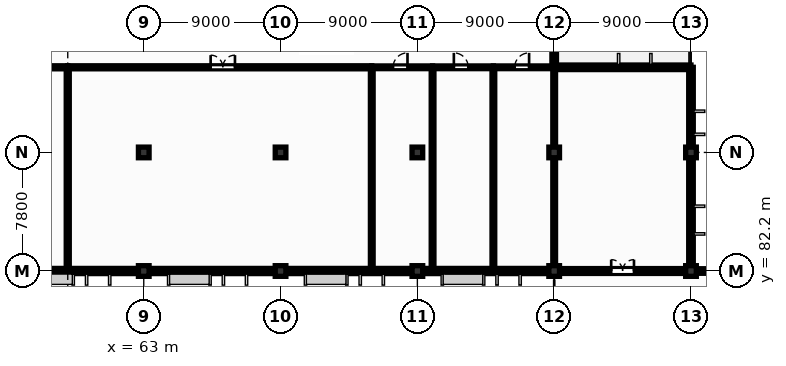
"""IFC4 building model, lengths in metres.
Left out: names, types, materials, properties, quantities, classifications, styles, units other than length and angle.
Written with IfcOpenShell. Run it as: python <this file> out.ifc"""

import sys

from ifc_helpers import new_model, si_unit, direction, frame, frame_2d, origin, origin_2d, place, context, subcontext, project, spatial, rectangle, extrude, element, fill, save


model = new_model("IFC4")
c1 = context("Model", 3, precision=1e-05, world=origin(), true_north=direction((0.0, 1.0)))
c2 = subcontext(c1, "Body", "Model", "MODEL_VIEW")
j1 = project(units=[si_unit("LENGTHUNIT", "METRE"), si_unit("PLANEANGLEUNIT", "RADIAN")], contexts=[c1])
p1 = place(None, origin())
s1 = spatial("IfcSite", under=j1, at=p1, CompositionType="ELEMENT")
p2 = place(p1, origin())
s2 = spatial("IfcBuilding", under=s1, at=p2, CompositionType="ELEMENT")
p3 = place(p2, frame((0.0, 0.0, 12.78)))
s3 = spatial("IfcBuildingStorey", under=s2, at=p3, CompositionType="ELEMENT", Elevation=12.78)
for number, where, z_axis, x_axis in (
    (1, (63.0, 82.2, 0.0), (0.0, 0.0, 1.0), (1.0, 0.0, 0.0)),
    (2, (63.0, 90.0, 0.0), (0.0, 0.0, 1.0), (1.0, 0.0, 0.0)),
    (3, (72.0, 82.2, 0.0), (0.0, 0.0, 1.0), (1.0, 0.0, 0.0)),
    (4, (72.0, 90.0, 0.0), (0.0, 0.0, 1.0), (1.0, 0.0, 0.0)),
    (5, (81.0, 82.2, 0.0), (0.0, 0.0, 1.0), (1.0, 0.0, 0.0)),
    (6, (81.0, 90.0, 0.0), (0.0, 0.0, 1.0), (1.0, 0.0, 0.0)),
    (7, (90.0, 82.2, 0.0), (0.0, 0.0, 1.0), (1.0, 0.0, 0.0)),
    (8, (90.0, 90.0, 0.0), (0.0, 0.0, 1.0), (1.0, 0.0, 0.0)),
    (9, (99.0, 82.2, 0.0), (0.0, 0.0, 1.0), (1.0, 0.0, 0.0)),
    (10, (99.0, 90.0, 0.0), (0.0, 0.0, 1.0), (1.0, 0.0, 0.0)),
):
    element("IfcColumn", number, at=place(p3, frame(where, z_axis=z_axis, x_axis=x_axis)), inside=s3, PredefinedType="COLUMN", context=c2, shape_type="SweptSolid", body=[
        extrude(rectangle(XDim=0.7, YDim=0.7, at=origin_2d()), origin(), (0.0, 0.0, 1.0), 3.74),
    ])
p4 = place(p3, frame((54.0, 82.2, 0.0), z_axis=(0.0, 0.0, 1.0), x_axis=(1.0, 0.0, 0.0)))
e11 = element("IfcWall", 11, at=p4, inside=s3, PredefinedType="SOLIDWALL", context=c2, shape_type="SweptSolid", body=[
    extrude(rectangle(XDim=9.0, YDim=0.34, at=frame_2d((4.5, 0.0))), origin(), (0.0, 0.0, 1.0), 3.42),
])
p5 = place(p4, frame((5.4, 0.0, 0.575)))
e12 = element("IfcOpeningElement", 12, at=p5, cuts=e11, PredefinedType="OPENING", context=c2, shape_type="SweptSolid", body=[
    extrude(rectangle(XDim=1.2, YDim=2.1, at=frame_2d((0.6, 1.05))), frame((0.0, 0.18, 0.0), z_axis=(0.0, -1.0, 0.0), x_axis=(1.0, 0.0, 0.0)), (0.0, 0.0, 1.0), 0.36),
])
p6 = place(p3, frame((63.0, 82.2, 0.0), z_axis=(0.0, 0.0, 1.0), x_axis=(1.0, 0.0, 0.0)))
e13 = element("IfcWall", 13, at=p6, inside=s3, PredefinedType="SOLIDWALL", context=c2, shape_type="SweptSolid", body=[
    extrude(rectangle(XDim=9.0, YDim=0.34, at=frame_2d((4.5, 0.0))), origin(), (0.0, 0.0, 1.0), 3.42),
])
p7 = place(p6, frame((1.8, 0.0, 0.85)))
e14 = element("IfcOpeningElement", 14, at=p7, cuts=e13, PredefinedType="OPENING", context=c2, shape_type="SweptSolid", body=[
    extrude(rectangle(XDim=2.4, YDim=1.1, at=frame_2d((1.2, 0.55))), frame((0.0, 0.18, 0.0), z_axis=(0.0, -1.0, 0.0), x_axis=(1.0, 0.0, 0.0)), (0.0, 0.0, 1.0), 0.36),
])
p8 = place(p6, frame((5.4, 0.0, 0.575)))
e15 = element("IfcOpeningElement", 15, at=p8, cuts=e13, PredefinedType="OPENING", context=c2, shape_type="SweptSolid", body=[
    extrude(rectangle(XDim=1.2, YDim=2.1, at=frame_2d((0.6, 1.05))), frame((0.0, 0.18, 0.0), z_axis=(0.0, -1.0, 0.0), x_axis=(1.0, 0.0, 0.0)), (0.0, 0.0, 1.0), 0.36),
])
p9 = place(p3, frame((72.0, 82.2, 0.0), z_axis=(0.0, 0.0, 1.0), x_axis=(1.0, 0.0, 0.0)))
e16 = element("IfcWall", 16, at=p9, inside=s3, PredefinedType="SOLIDWALL", context=c2, shape_type="SweptSolid", body=[
    extrude(rectangle(XDim=9.0, YDim=0.34, at=frame_2d((4.5, 0.0))), origin(), (0.0, 0.0, 1.0), 3.42),
])
p10 = place(p9, frame((1.8, 0.0, 0.85)))
e17 = element("IfcOpeningElement", 17, at=p10, cuts=e16, PredefinedType="OPENING", context=c2, shape_type="SweptSolid", body=[
    extrude(rectangle(XDim=2.4, YDim=1.1, at=frame_2d((1.2, 0.55))), frame((0.0, 0.18, 0.0), z_axis=(0.0, -1.0, 0.0), x_axis=(1.0, 0.0, 0.0)), (0.0, 0.0, 1.0), 0.36),
])
p11 = place(p3, frame((81.0, 82.2, 0.0), z_axis=(0.0, 0.0, 1.0), x_axis=(1.0, 0.0, 0.0)))
e18 = element("IfcWall", 18, at=p11, inside=s3, PredefinedType="SOLIDWALL", context=c2, shape_type="SweptSolid", body=[
    extrude(rectangle(XDim=9.0, YDim=0.34, at=frame_2d((4.5, 0.0))), origin(), (0.0, 0.0, 1.0), 3.42),
])
p12 = place(p11, frame((1.8, 0.0, 0.85)))
e19 = element("IfcOpeningElement", 19, at=p12, cuts=e18, PredefinedType="OPENING", context=c2, shape_type="SweptSolid", body=[
    extrude(rectangle(XDim=2.4, YDim=1.1, at=frame_2d((1.2, 0.55))), frame((0.0, 0.18, 0.0), z_axis=(0.0, -1.0, 0.0), x_axis=(1.0, 0.0, 0.0)), (0.0, 0.0, 1.0), 0.36),
])
p13 = place(p11, frame((5.4, 0.0, 0.665)))
e20 = element("IfcOpeningElement", 20, at=p13, cuts=e18, PredefinedType="OPENING", context=c2, shape_type="SweptSolid", body=[
    extrude(rectangle(XDim=1.2, YDim=2.1, at=frame_2d((0.6, 1.05))), frame((0.0, 0.18, 0.0), z_axis=(0.0, -1.0, 0.0), x_axis=(1.0, 0.0, 0.0)), (0.0, 0.0, 1.0), 0.36),
])
p14 = place(p3, frame((99.0, 82.2, 0.0), z_axis=(0.0, 0.0, 1.0), x_axis=(0.0, 1.0, 0.0)))
e21 = element("IfcWall", 21, at=p14, inside=s3, PredefinedType="SOLIDWALL", context=c2, shape_type="SweptSolid", body=[
    extrude(rectangle(XDim=13.4, YDim=0.3, at=frame_2d((6.7, 0.0))), origin(), (0.0, 0.0, 1.0), 2.685),
])
p15 = place(p14, frame((2.6, 0.0, 0.465)))
e22 = element("IfcOpeningElement", 22, at=p15, cuts=e21, PredefinedType="OPENING", context=c2, shape_type="SweptSolid", body=[
    extrude(rectangle(XDim=1.5, YDim=2.1, at=frame_2d((0.75, 1.05))), frame((0.0, 0.16, 0.0), z_axis=(0.0, -1.0, 0.0), x_axis=(1.0, 0.0, 0.0)), (0.0, 0.0, 1.0), 0.32),
])
p16 = place(p14, frame((9.15, 0.0, 0.465)))
e23 = element("IfcOpeningElement", 23, at=p16, cuts=e21, PredefinedType="OPENING", context=c2, shape_type="SweptSolid", body=[
    extrude(rectangle(XDim=1.2, YDim=2.1, at=frame_2d((0.6, 1.05))), frame((0.0, 0.16, 0.0), z_axis=(0.0, -1.0, 0.0), x_axis=(1.0, 0.0, 0.0)), (0.0, 0.0, 1.0), 0.32),
])
p17 = place(p3, frame((99.0, 95.6, 0.0), z_axis=(0.0, 0.0, 1.0), x_axis=(-1.0, 0.0, 0.0)))
e24 = element("IfcWall", 24, at=p17, inside=s3, PredefinedType="SOLIDWALL", context=c2, shape_type="SweptSolid", body=[
    extrude(rectangle(XDim=9.0, YDim=0.3, at=frame_2d((4.5, 0.0))), origin(), (0.0, 0.0, 1.0), 3.42),
])
p18 = place(p17, frame((2.8, 0.0, 0.95)))
e25 = element("IfcOpeningElement", 25, at=p18, cuts=e24, PredefinedType="OPENING", context=c2, shape_type="SweptSolid", body=[
    extrude(rectangle(XDim=1.8, YDim=2.1, at=frame_2d((0.9, 1.05))), frame((0.0, 0.16, 0.0), z_axis=(0.0, -1.0, 0.0), x_axis=(1.0, 0.0, 0.0)), (0.0, 0.0, 1.0), 0.32),
])
p19 = place(p3, frame((90.0, 95.6, 0.0), z_axis=(0.0, 0.0, 1.0), x_axis=(0.0, 1.0, 0.0)))
e26 = element("IfcWall", 26, at=p19, inside=s3, PredefinedType="SOLIDWALL", context=c2, shape_type="SweptSolid", body=[
    extrude(rectangle(XDim=18.4, YDim=0.3, at=frame_2d((9.2, 0.0))), origin(), (0.0, 0.0, 1.0), 2.805),
])
p20 = place(p19, frame((4.4, 0.0, 0.0)))
e27 = element("IfcOpeningElement", 27, at=p20, cuts=e26, PredefinedType="OPENING", context=c2, shape_type="SweptSolid", body=[
    extrude(rectangle(XDim=1.6, YDim=2.25, at=frame_2d((0.8, 1.125))), frame((0.0, 0.16, 0.0), z_axis=(0.0, -1.0, 0.0), x_axis=(1.0, 0.0, 0.0)), (0.0, 0.0, 1.0), 0.32),
])
p21 = place(p19, frame((12.8, 0.0, 0.935)))
e28 = element("IfcOpeningElement", 28, at=p21, cuts=e26, PredefinedType="OPENING", context=c2, shape_type="SweptSolid", body=[
    extrude(rectangle(XDim=1.05, YDim=1.75, at=frame_2d((0.525, 0.875))), frame((0.0, 0.16, 0.0), z_axis=(0.0, -1.0, 0.0), x_axis=(1.0, 0.0, 0.0)), (0.0, 0.0, 1.0), 0.32),
])
p22 = place(p3, frame((99.0, 82.2, 0.0), z_axis=(0.0, 0.0, 1.0), x_axis=(1.0, 0.0, 0.0)))
e29 = element("IfcWall", 29, at=p22, inside=s3, PredefinedType="SOLIDWALL", context=c2, shape_type="SweptSolid", body=[
    extrude(rectangle(XDim=9.0, YDim=0.3, at=frame_2d((4.5, 0.0))), origin(), (0.0, 0.0, 1.0), 2.853),
])
p23 = place(p22, frame((2.6, 0.0, 0.633)))
e30 = element("IfcOpeningElement", 30, at=p23, cuts=e29, PredefinedType="OPENING", context=c2, shape_type="SweptSolid", body=[
    extrude(rectangle(XDim=1.8, YDim=2.1, at=frame_2d((0.9, 1.05))), frame((0.0, 0.16, 0.0), z_axis=(0.0, -1.0, 0.0), x_axis=(1.0, 0.0, 0.0)), (0.0, 0.0, 1.0), 0.32),
])
p24 = place(p3, frame((90.0, 82.2, 0.0), z_axis=(0.0, 0.0, 1.0), x_axis=(1.0, 0.0, 0.0)))
e31 = element("IfcWall", 31, at=p24, inside=s3, PredefinedType="SHEAR", context=c2, shape_type="SweptSolid", body=[
    extrude(rectangle(XDim=9.0, YDim=0.32, at=frame_2d((4.5, 0.0))), origin(), (0.0, 0.0, 1.0), 3.42),
])
p25 = place(p24, frame((3.75, 0.0, 0.0)))
e32 = element("IfcOpeningElement", 32, at=p25, cuts=e31, PredefinedType="OPENING", context=c2, shape_type="SweptSolid", body=[
    extrude(rectangle(XDim=1.5, YDim=2.2, at=frame_2d((0.75, 1.1))), frame((0.0, 0.17, 0.0), z_axis=(0.0, -1.0, 0.0), x_axis=(1.0, 0.0, 0.0)), (0.0, 0.0, 1.0), 0.34),
])
p26 = place(p3, frame((36.0, 95.6, 0.0), z_axis=(0.0, 0.0, 1.0), x_axis=(1.0, 0.0, 0.0)))
e33 = element("IfcWall", 33, at=p26, inside=s3, PredefinedType="PARTITIONING", context=c2, shape_type="SweptSolid", body=[
    extrude(rectangle(XDim=22.0, YDim=0.2, at=frame_2d((11.0, 0.0))), origin(), (0.0, 0.0, 1.0), 3.42),
])
p27 = place(p26, frame((10.4, 0.0, 0.0)))
e34 = element("IfcOpeningElement", 34, at=p27, cuts=e33, PredefinedType="OPENING", context=c2, shape_type="SweptSolid", body=[
    extrude(rectangle(XDim=1.6, YDim=2.2, at=frame_2d((0.8, 1.1))), frame((0.0, 0.11, 0.0), z_axis=(0.0, -1.0, 0.0), x_axis=(1.0, 0.0, 0.0)), (0.0, 0.0, 1.0), 0.22),
])
p28 = place(p3, frame((58.0, 95.6, 0.0), z_axis=(0.0, 0.0, 1.0), x_axis=(1.0, 0.0, 0.0)))
e35 = element("IfcWall", 35, at=p28, inside=s3, PredefinedType="PARTITIONING", context=c2, shape_type="SweptSolid", body=[
    extrude(rectangle(XDim=20.0, YDim=0.2, at=frame_2d((10.0, 0.0))), origin(), (0.0, 0.0, 1.0), 3.42),
])
p29 = place(p28, frame((9.4, 0.0, 0.0)))
e36 = element("IfcOpeningElement", 36, at=p29, cuts=e35, PredefinedType="OPENING", context=c2, shape_type="SweptSolid", body=[
    extrude(rectangle(XDim=1.6, YDim=2.2, at=frame_2d((0.8, 1.1))), frame((0.0, 0.11, 0.0), z_axis=(0.0, -1.0, 0.0), x_axis=(1.0, 0.0, 0.0)), (0.0, 0.0, 1.0), 0.22),
])
p30 = place(p3, frame((58.0, 82.2, 0.0), z_axis=(0.0, 0.0, 1.0), x_axis=(0.0, 1.0, 0.0)))
e37 = element("IfcWall", 37, at=p30, inside=s3, PredefinedType="PARTITIONING", context=c2, shape_type="SweptSolid", body=[
    extrude(rectangle(XDim=13.4, YDim=0.2, at=frame_2d((6.7, 0.0))), origin(), (0.0, 0.0, 1.0), 3.42),
])
p31 = place(p3, frame((78.0, 95.6, 0.0), z_axis=(0.0, 0.0, 1.0), x_axis=(1.0, 0.0, 0.0)))
e38 = element("IfcWall", 38, at=p31, inside=s3, PredefinedType="PLUMBINGWALL", context=c2, shape_type="SweptSolid", body=[
    extrude(rectangle(XDim=4.0, YDim=0.18, at=frame_2d((2.0, 0.0))), origin(), (0.0, 0.0, 1.0), 3.42),
])
p32 = place(p31, frame((1.4, 0.0, 0.0)))
e39 = element("IfcOpeningElement", 39, at=p32, cuts=e38, PredefinedType="OPENING", context=c2, shape_type="SweptSolid", body=[
    extrude(rectangle(XDim=0.95, YDim=2.15, at=frame_2d((0.475, 1.075))), frame((0.0, 0.1, 0.0), z_axis=(0.0, -1.0, 0.0), x_axis=(1.0, 0.0, 0.0)), (0.0, 0.0, 1.0), 0.2),
])
p33 = place(p3, frame((78.0, 82.2, 0.0), z_axis=(0.0, 0.0, 1.0), x_axis=(0.0, 1.0, 0.0)))
e40 = element("IfcWall", 40, at=p33, inside=s3, PredefinedType="PLUMBINGWALL", context=c2, shape_type="SweptSolid", body=[
    extrude(rectangle(XDim=13.4, YDim=0.18, at=frame_2d((6.7, 0.0))), origin(), (0.0, 0.0, 1.0), 3.42),
])
p34 = place(p3, frame((82.0, 95.6, 0.0), z_axis=(0.0, 0.0, 1.0), x_axis=(1.0, 0.0, 0.0)))
e41 = element("IfcWall", 41, at=p34, inside=s3, PredefinedType="PLUMBINGWALL", context=c2, shape_type="SweptSolid", body=[
    extrude(rectangle(XDim=4.0, YDim=0.18, at=frame_2d((2.0, 0.0))), origin(), (0.0, 0.0, 1.0), 3.42),
])
p35 = place(p34, frame((1.4, 0.0, 0.0)))
e42 = element("IfcOpeningElement", 42, at=p35, cuts=e41, PredefinedType="OPENING", context=c2, shape_type="SweptSolid", body=[
    extrude(rectangle(XDim=0.95, YDim=2.15, at=frame_2d((0.475, 1.075))), frame((0.0, 0.1, 0.0), z_axis=(0.0, -1.0, 0.0), x_axis=(1.0, 0.0, 0.0)), (0.0, 0.0, 1.0), 0.2),
])
p36 = place(p3, frame((82.0, 82.2, 0.0), z_axis=(0.0, 0.0, 1.0), x_axis=(0.0, 1.0, 0.0)))
e43 = element("IfcWall", 43, at=p36, inside=s3, PredefinedType="PLUMBINGWALL", context=c2, shape_type="SweptSolid", body=[
    extrude(rectangle(XDim=13.4, YDim=0.18, at=frame_2d((6.7, 0.0))), origin(), (0.0, 0.0, 1.0), 3.42),
])
p37 = place(p3, frame((86.0, 95.6, 0.0), z_axis=(0.0, 0.0, 1.0), x_axis=(1.0, 0.0, 0.0)))
e44 = element("IfcWall", 44, at=p37, inside=s3, PredefinedType="PLUMBINGWALL", context=c2, shape_type="SweptSolid", body=[
    extrude(rectangle(XDim=4.0, YDim=0.18, at=frame_2d((2.0, 0.0))), origin(), (0.0, 0.0, 1.0), 3.42),
])
p38 = place(p37, frame((1.4, 0.0, 0.0)))
e45 = element("IfcOpeningElement", 45, at=p38, cuts=e44, PredefinedType="OPENING", context=c2, shape_type="SweptSolid", body=[
    extrude(rectangle(XDim=0.95, YDim=2.15, at=frame_2d((0.475, 1.075))), frame((0.0, 0.1, 0.0), z_axis=(0.0, -1.0, 0.0), x_axis=(1.0, 0.0, 0.0)), (0.0, 0.0, 1.0), 0.2),
])
p39 = place(p3, frame((86.0, 82.2, 0.0), z_axis=(0.0, 0.0, 1.0), x_axis=(0.0, 1.0, 0.0)))
e46 = element("IfcWall", 46, at=p39, inside=s3, PredefinedType="PLUMBINGWALL", context=c2, shape_type="SweptSolid", body=[
    extrude(rectangle(XDim=13.4, YDim=0.18, at=frame_2d((6.7, 0.0))), origin(), (0.0, 0.0, 1.0), 3.42),
])
p40 = place(p3, frame((90.0, 82.2, 0.0), z_axis=(0.0, 0.0, 1.0), x_axis=(0.0, 1.0, 0.0)))
e47 = element("IfcWall", 47, at=p40, inside=s3, PredefinedType="PLUMBINGWALL", context=c2, shape_type="SweptSolid", body=[
    extrude(rectangle(XDim=13.4, YDim=0.18, at=frame_2d((6.7, 0.0))), origin(), (0.0, 0.0, 1.0), 2.805),
])
p41 = place(p5, origin())
e48 = element("IfcWindow", 48, at=p41, inside=s3, PartitioningType="SINGLE_PANEL", PredefinedType="WINDOW", context=c2, shape_type="SweptSolid", body=[
    extrude(rectangle(XDim=1.2, YDim=2.1, at=frame_2d((0.6, 1.05))), frame((0.0, 0.03, 0.0), z_axis=(0.0, -1.0, 0.0), x_axis=(1.0, 0.0, 0.0)), (0.0, 0.0, 1.0), 0.06),
])
fill(e12, e48)
p42 = place(p7, origin())
e49 = element("IfcWindow", 49, at=p42, inside=s3, PartitioningType="SINGLE_PANEL", PredefinedType="WINDOW", context=c2, shape_type="SweptSolid", body=[
    extrude(rectangle(XDim=2.4, YDim=1.1, at=frame_2d((1.2, 0.55))), frame((0.0, 0.03, 0.0), z_axis=(0.0, -1.0, 0.0), x_axis=(1.0, 0.0, 0.0)), (0.0, 0.0, 1.0), 0.06),
])
fill(e14, e49)
p43 = place(p8, origin())
e50 = element("IfcWindow", 50, at=p43, inside=s3, PartitioningType="SINGLE_PANEL", PredefinedType="WINDOW", context=c2, shape_type="SweptSolid", body=[
    extrude(rectangle(XDim=1.2, YDim=2.1, at=frame_2d((0.6, 1.05))), frame((0.0, 0.03, 0.0), z_axis=(0.0, -1.0, 0.0), x_axis=(1.0, 0.0, 0.0)), (0.0, 0.0, 1.0), 0.06),
])
fill(e15, e50)
p44 = place(p10, origin())
e51 = element("IfcWindow", 51, at=p44, inside=s3, PartitioningType="SINGLE_PANEL", PredefinedType="WINDOW", context=c2, shape_type="SweptSolid", body=[
    extrude(rectangle(XDim=2.4, YDim=1.1, at=frame_2d((1.2, 0.55))), frame((0.0, 0.03, 0.0), z_axis=(0.0, -1.0, 0.0), x_axis=(1.0, 0.0, 0.0)), (0.0, 0.0, 1.0), 0.06),
])
fill(e17, e51)
p45 = place(p12, origin())
e52 = element("IfcWindow", 52, at=p45, inside=s3, PartitioningType="SINGLE_PANEL", PredefinedType="WINDOW", context=c2, shape_type="SweptSolid", body=[
    extrude(rectangle(XDim=2.4, YDim=1.1, at=frame_2d((1.2, 0.55))), frame((0.0, 0.03, 0.0), z_axis=(0.0, -1.0, 0.0), x_axis=(1.0, 0.0, 0.0)), (0.0, 0.0, 1.0), 0.06),
])
fill(e19, e52)
p46 = place(p13, origin())
e53 = element("IfcWindow", 53, at=p46, inside=s3, PartitioningType="SINGLE_PANEL", PredefinedType="WINDOW", context=c2, shape_type="SweptSolid", body=[
    extrude(rectangle(XDim=1.2, YDim=2.1, at=frame_2d((0.6, 1.05))), frame((0.0, 0.03, 0.0), z_axis=(0.0, -1.0, 0.0), x_axis=(1.0, 0.0, 0.0)), (0.0, 0.0, 1.0), 0.06),
])
fill(e20, e53)
p47 = place(p15, origin())
e54 = element("IfcWindow", 54, at=p47, inside=s3, PartitioningType="SINGLE_PANEL", PredefinedType="WINDOW", context=c2, shape_type="SweptSolid", body=[
    extrude(rectangle(XDim=1.5, YDim=2.1, at=frame_2d((0.75, 1.05))), frame((0.0, 0.03, 0.0), z_axis=(0.0, -1.0, 0.0), x_axis=(1.0, 0.0, 0.0)), (0.0, 0.0, 1.0), 0.06),
])
fill(e22, e54)
p48 = place(p16, origin())
e55 = element("IfcWindow", 55, at=p48, inside=s3, PartitioningType="SINGLE_PANEL", PredefinedType="WINDOW", context=c2, shape_type="SweptSolid", body=[
    extrude(rectangle(XDim=1.2, YDim=2.1, at=frame_2d((0.6, 1.05))), frame((0.0, 0.03, 0.0), z_axis=(0.0, -1.0, 0.0), x_axis=(1.0, 0.0, 0.0)), (0.0, 0.0, 1.0), 0.06),
])
fill(e23, e55)
p49 = place(p18, origin())
e56 = element("IfcWindow", 56, at=p49, inside=s3, PartitioningType="SINGLE_PANEL", PredefinedType="WINDOW", context=c2, shape_type="SweptSolid", body=[
    extrude(rectangle(XDim=1.8, YDim=2.1, at=frame_2d((0.9, 1.05))), frame((0.0, 0.03, 0.0), z_axis=(0.0, -1.0, 0.0), x_axis=(1.0, 0.0, 0.0)), (0.0, 0.0, 1.0), 0.06),
])
fill(e25, e56)
p50 = place(p25, origin())
e57 = element("IfcDoor", 57, at=p50, inside=s3, OperationType="DOUBLE_DOOR_SINGLE_SWING", PredefinedType="DOOR", context=c2, shape_type="SweptSolid", body=[
    extrude(rectangle(XDim=1.5, YDim=2.2, at=frame_2d((0.75, 1.1))), frame((0.0, 0.025, 0.0), z_axis=(0.0, -1.0, 0.0), x_axis=(1.0, 0.0, 0.0)), (0.0, 0.0, 1.0), 0.05),
])
fill(e32, e57)
p51 = place(p29, origin())
e58 = element("IfcDoor", 58, at=p51, inside=s3, OperationType="DOUBLE_DOOR_SINGLE_SWING", PredefinedType="DOOR", context=c2, shape_type="SweptSolid", body=[
    extrude(rectangle(XDim=1.6, YDim=2.2, at=frame_2d((0.8, 1.1))), frame((0.0, 0.025, 0.0), z_axis=(0.0, -1.0, 0.0), x_axis=(1.0, 0.0, 0.0)), (0.0, 0.0, 1.0), 0.05),
])
fill(e36, e58)
p52 = place(p32, origin())
e59 = element("IfcDoor", 59, at=p52, inside=s3, OperationType="SINGLE_SWING_RIGHT", PredefinedType="DOOR", context=c2, shape_type="SweptSolid", body=[
    extrude(rectangle(XDim=0.95, YDim=2.15, at=frame_2d((0.475, 1.075))), frame((0.0, 0.025, 0.0), z_axis=(0.0, -1.0, 0.0), x_axis=(1.0, 0.0, 0.0)), (0.0, 0.0, 1.0), 0.05),
])
fill(e39, e59)
p53 = place(p35, origin())
e60 = element("IfcDoor", 60, at=p53, inside=s3, OperationType="SINGLE_SWING_LEFT", PredefinedType="DOOR", context=c2, shape_type="SweptSolid", body=[
    extrude(rectangle(XDim=0.95, YDim=2.15, at=frame_2d((0.475, 1.075))), frame((0.0, 0.025, 0.0), z_axis=(0.0, -1.0, 0.0), x_axis=(1.0, 0.0, 0.0)), (0.0, 0.0, 1.0), 0.05),
])
fill(e42, e60)
p54 = place(p38, origin())
e61 = element("IfcDoor", 61, at=p54, inside=s3, OperationType="SINGLE_SWING_RIGHT", PredefinedType="DOOR", context=c2, shape_type="SweptSolid", body=[
    extrude(rectangle(XDim=0.95, YDim=2.15, at=frame_2d((0.475, 1.075))), frame((0.0, 0.025, 0.0), z_axis=(0.0, -1.0, 0.0), x_axis=(1.0, 0.0, 0.0)), (0.0, 0.0, 1.0), 0.05),
])
fill(e45, e61)
save(model, sys.argv[1])
